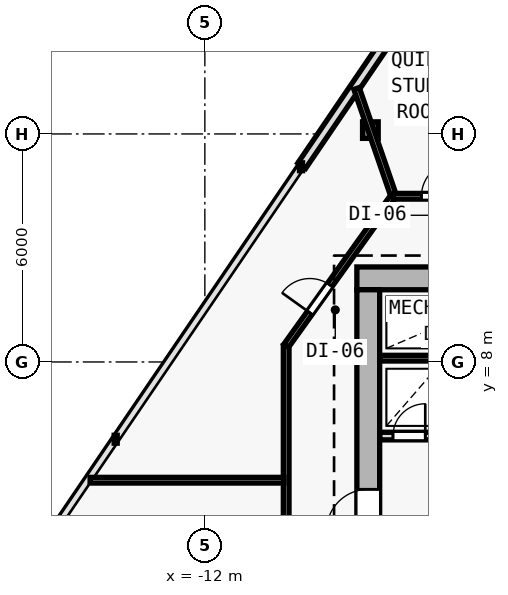
"""IFC4 building model, lengths in metres.
Left out: names, types, materials, properties, quantities, classifications, styles, units other than length and angle.
Written with IfcOpenShell. Run it as: python <this file> out.ifc"""

import sys

from ifc_helpers import new_model, si_unit, direction, frame, frame_2d, origin, origin_2d, place, context, subcontext, project, spatial, rectangle, i_section, extrude, element, fill, save


model = new_model("IFC4")
c1 = context("Model", 3, precision=1e-05, world=origin(), true_north=direction((0.0, 1.0)))
c2 = subcontext(c1, "Body", "Model", "MODEL_VIEW")
j1 = project(units=[si_unit("LENGTHUNIT", "METRE"), si_unit("PLANEANGLEUNIT", "RADIAN")], contexts=[c1])
p1 = place(None, origin())
s1 = spatial("IfcSite", under=j1, at=p1, CompositionType="ELEMENT")
p2 = place(p1, origin())
s2 = spatial("IfcBuilding", under=s1, at=p2, CompositionType="ELEMENT")
p3 = place(p2, frame((0.0, 0.0, 66.0)))
s3 = spatial("IfcBuildingStorey", under=s2, at=p3, CompositionType="ELEMENT", Elevation=66.0)
p4 = place(p3, frame((-7.7, 10.2, 0.0), z_axis=(0.0, 0.0, 1.0), x_axis=(1.0, 0.0, 0.0)))
e1 = element("IfcColumn", 1, at=p4, inside=s3, PredefinedType="COLUMN", context=c2, shape_type="SweptSolid", body=[
    extrude(i_section(OverallWidth=0.416, OverallDepth=0.446, WebThickness=0.025, FlangeThickness=0.04, FilletRadius=0.015, at=origin_2d()), origin(), (0.0, 0.0, 1.0), 3.6),
])
p5 = place(p3, frame((-7.644, 14.101, 0.006), z_axis=(0.008843162072, -0.002584924298, 0.999957557425), x_axis=(0.280566991813, 0.959834445675, 0.0)))
e2 = element("IfcColumn", 2, at=p5, inside=s3, PredefinedType="COLUMN", context=c2, shape_type="SweptSolid", body=[
    extrude(i_section(OverallWidth=0.412, OverallDepth=0.435, WebThickness=0.023, FlangeThickness=0.037, FilletRadius=0.015, at=origin_2d()), origin(), (0.0, 0.0, 1.0), 3.589),
])
p6 = place(p3, frame((-9.451, 13.163, 0.0), z_axis=(0.0, 0.0, 1.0), x_axis=(0.562478152622, 0.826812147844, 0.0)))
e3 = element("IfcWall", 3, at=p6, inside=s3, PredefinedType="SOLIDWALL", context=c2, shape_type="SweptSolid", body=[
    extrude(rectangle(XDim=12.232, YDim=0.25, at=frame_2d((6.116, 0.0))), origin(), (0.0, 0.0, 1.0), 3.35),
])
p7 = place(p6, frame((5.516, 0.0, 0.62)))
e4 = element("IfcOpeningElement", 4, at=p7, cuts=e3, PredefinedType="OPENING", context=c2, shape_type="SweptSolid", body=[
    extrude(rectangle(XDim=1.2, YDim=1.8, at=frame_2d((0.6, 0.9))), frame((0.0, 0.135, 0.0), z_axis=(0.0, -1.0, 0.0), x_axis=(1.0, 0.0, 0.0)), (0.0, 0.0, 1.0), 0.27),
])
p8 = place(p3, frame((8.0, 10.2, 0.0), z_axis=(0.0, 0.0, 1.0), x_axis=(-1.0, 0.0, 0.0)))
e5 = element("IfcWall", 5, at=p8, inside=s3, PredefinedType="SHEAR", context=c2, shape_type="SweptSolid", body=[
    extrude(rectangle(XDim=16.0, YDim=0.6, at=frame_2d((8.0, 0.0))), origin(), (0.0, 0.0, 1.0), 3.35),
])
p9 = place(p8, frame((4.45, 0.0, 0.0)))
e6 = element("IfcOpeningElement", 6, at=p9, cuts=e5, PredefinedType="OPENING", context=c2, shape_type="SweptSolid", body=[
    extrude(rectangle(XDim=1.1, YDim=2.15, at=frame_2d((0.55, 1.075))), frame((0.0, 0.31, 0.0), z_axis=(0.0, -1.0, 0.0), x_axis=(1.0, 0.0, 0.0)), (0.0, 0.0, 1.0), 0.62),
])
p10 = place(p3, frame((-7.7, -9.1, 0.0), z_axis=(0.0, 0.0, 1.0), x_axis=(0.0, 1.0, 0.0)))
e7 = element("IfcWall", 7, at=p10, inside=s3, PredefinedType="SHEAR", context=c2, shape_type="SweptSolid", body=[
    extrude(rectangle(XDim=19.0, YDim=0.6, at=frame_2d((9.5, 0.0))), origin(), (0.0, 0.0, 1.0), 3.35),
])
p11 = place(p10, frame((12.65, 0.0, 0.0)))
e8 = element("IfcOpeningElement", 8, at=p11, cuts=e7, PredefinedType="OPENING", context=c2, shape_type="SweptSolid", body=[
    extrude(rectangle(XDim=1.1, YDim=2.15, at=frame_2d((0.55, 1.075))), frame((0.0, 0.31, 0.0), z_axis=(0.0, -1.0, 0.0), x_axis=(1.0, 0.0, 0.0)), (0.0, 0.0, 1.0), 0.62),
])
p12 = place(p3, frame((-7.395, 6.05, 0.0), z_axis=(0.0, 0.0, 1.0), x_axis=(1.0, 0.0, 0.0)))
e9 = element("IfcWall", 9, at=p12, inside=s3, PredefinedType="SOLIDWALL", context=c2, shape_type="SweptSolid", body=[
    extrude(rectangle(XDim=3.545, YDim=0.2, at=frame_2d((1.772, 0.0))), origin(), (0.0, 0.0, 1.0), 3.35),
])
p13 = place(p12, frame((0.345, 0.0, 0.0)))
e10 = element("IfcOpeningElement", 10, at=p13, cuts=e9, PredefinedType="OPENING", context=c2, shape_type="SweptSolid", body=[
    extrude(rectangle(XDim=0.85, YDim=2.1, at=frame_2d((0.425, 1.05))), frame((0.0, 0.11, 0.0), z_axis=(0.0, -1.0, 0.0), x_axis=(1.0, 0.0, 0.0)), (0.0, 0.0, 1.0), 0.22),
])
p14 = place(p12, frame((2.145, 0.0, 0.0)))
e11 = element("IfcOpeningElement", 11, at=p14, cuts=e9, PredefinedType="OPENING", context=c2, shape_type="SweptSolid", body=[
    extrude(rectangle(XDim=0.85, YDim=2.1, at=frame_2d((0.425, 1.05))), frame((0.0, 0.11, 0.0), z_axis=(0.0, -1.0, 0.0), x_axis=(1.0, 0.0, 0.0)), (0.0, 0.0, 1.0), 0.22),
])
p15 = place(p3, frame((-7.395, 8.1, 0.0), z_axis=(0.0, 0.0, 1.0), x_axis=(1.0, 0.0, 0.0)))
e12 = element("IfcWall", 12, at=p15, inside=s3, PredefinedType="PARTITIONING", context=c2, shape_type="SweptSolid", body=[
    extrude(rectangle(XDim=3.545, YDim=0.15, at=frame_2d((1.772, 0.0))), origin(), (0.0, 0.0, 1.0), 3.35),
])
p16 = place(p3, frame((-9.86, -11.56, 0.0), z_axis=(0.0, 0.0, 1.0), x_axis=(0.0, 1.0, 0.0)))
e13 = element("IfcWall", 13, at=p16, inside=s3, PredefinedType="PARTITIONING", context=c2, shape_type="SweptSolid", body=[
    extrude(rectangle(XDim=19.986, YDim=0.15, at=frame_2d((9.993, 0.0))), origin(), (0.0, 0.0, 1.0), 2.609),
])
p17 = place(p16, frame((9.311, 0.0, 0.0)))
e14 = element("IfcOpeningElement", 14, at=p17, cuts=e13, PredefinedType="OPENING", context=c2, shape_type="SweptSolid", body=[
    extrude(rectangle(XDim=0.9, YDim=2.1, at=frame_2d((0.45, 1.05))), frame((0.0, 0.085, 0.0), z_axis=(0.0, -1.0, 0.0), x_axis=(1.0, 0.0, 0.0)), (0.0, 0.0, 1.0), 0.17),
])
p18 = place(p16, frame((4.681, 0.0, 0.0)))
e15 = element("IfcOpeningElement", 15, at=p18, cuts=e13, PredefinedType="OPENING", context=c2, shape_type="SweptSolid", body=[
    extrude(rectangle(XDim=0.9, YDim=2.1, at=frame_2d((0.45, 1.05))), frame((0.0, 0.085, 0.0), z_axis=(0.0, -1.0, 0.0), x_axis=(1.0, 0.0, 0.0)), (0.0, 0.0, 1.0), 0.17),
])
p19 = place(p16, frame((0.919, 0.0, 0.0)))
e16 = element("IfcOpeningElement", 16, at=p19, cuts=e13, PredefinedType="OPENING", context=c2, shape_type="SweptSolid", body=[
    extrude(rectangle(XDim=0.9, YDim=2.1, at=frame_2d((0.45, 1.05))), frame((0.0, 0.085, 0.0), z_axis=(0.0, -1.0, 0.0), x_axis=(1.0, 0.0, 0.0)), (0.0, 0.0, 1.0), 0.17),
])
p20 = place(p16, frame((13.684, 0.0, 0.0)))
e17 = element("IfcOpeningElement", 17, at=p20, cuts=e13, PredefinedType="OPENING", context=c2, shape_type="SweptSolid", body=[
    extrude(rectangle(XDim=0.9, YDim=2.1, at=frame_2d((0.45, 1.05))), frame((0.0, 0.085, 0.0), z_axis=(0.0, -1.0, 0.0), x_axis=(1.0, 0.0, 0.0)), (0.0, 0.0, 1.0), 0.17),
])
p21 = place(p3, frame((-9.86, 8.426, 0.0), z_axis=(0.0, 0.0, 1.0), x_axis=(0.582449511476, 0.812866881218, 0.0)))
e18 = element("IfcWall", 18, at=p21, inside=s3, PredefinedType="PARTITIONING", context=c2, shape_type="SweptSolid", body=[
    extrude(rectangle(XDim=4.84, YDim=0.15, at=frame_2d((2.42, 0.0))), origin(), (0.0, 0.0, 1.0), 2.725),
])
p22 = place(p21, frame((1.07, 0.0, 0.0)))
e19 = element("IfcOpeningElement", 19, at=p22, cuts=e18, PredefinedType="OPENING", context=c2, shape_type="SweptSolid", body=[
    extrude(rectangle(XDim=0.9, YDim=2.1, at=frame_2d((0.45, 1.05))), frame((0.0, 0.085, 0.0), z_axis=(0.0, -1.0, 0.0), x_axis=(1.0, 0.0, 0.0)), (0.0, 0.0, 1.0), 0.17),
])
p23 = place(p3, frame((-7.041, 12.36, 0.0), z_axis=(0.0, 0.0, 1.0), x_axis=(1.0, 0.0, 0.0)))
e20 = element("IfcWall", 20, at=p23, inside=s3, PredefinedType="PARTITIONING", context=c2, shape_type="SweptSolid", body=[
    extrude(rectangle(XDim=14.082, YDim=0.15, at=frame_2d((7.041, 0.0))), origin(), (0.0, 0.0, 1.0), 3.35),
])
p24 = place(p23, frame((12.784, 0.0, 0.0)))
e21 = element("IfcOpeningElement", 21, at=p24, cuts=e20, PredefinedType="OPENING", context=c2, shape_type="SweptSolid", body=[
    extrude(rectangle(XDim=0.85, YDim=2.1, at=frame_2d((0.425, 1.05))), frame((0.0, 0.085, 0.0), z_axis=(0.0, -1.0, 0.0), x_axis=(1.0, 0.0, 0.0)), (0.0, 0.0, 1.0), 0.17),
])
p25 = place(p23, frame((10.858, 0.0, 0.0)))
e22 = element("IfcOpeningElement", 22, at=p25, cuts=e20, PredefinedType="OPENING", context=c2, shape_type="SweptSolid", body=[
    extrude(rectangle(XDim=0.9, YDim=2.1, at=frame_2d((0.45, 1.05))), frame((0.0, 0.085, 0.0), z_axis=(0.0, -1.0, 0.0), x_axis=(1.0, 0.0, 0.0)), (0.0, 0.0, 1.0), 0.17),
])
p26 = place(p23, frame((8.904, 0.0, 0.0)))
e23 = element("IfcOpeningElement", 23, at=p26, cuts=e20, PredefinedType="OPENING", context=c2, shape_type="SweptSolid", body=[
    extrude(rectangle(XDim=0.85, YDim=2.1, at=frame_2d((0.425, 1.05))), frame((0.0, 0.085, 0.0), z_axis=(0.0, -1.0, 0.0), x_axis=(1.0, 0.0, 0.0)), (0.0, 0.0, 1.0), 0.17),
])
p27 = place(p23, frame((6.212, 0.0, 0.0)))
e24 = element("IfcOpeningElement", 24, at=p27, cuts=e20, PredefinedType="OPENING", context=c2, shape_type="SweptSolid", body=[
    extrude(rectangle(XDim=0.9, YDim=2.1, at=frame_2d((0.45, 1.05))), frame((0.0, 0.085, 0.0), z_axis=(0.0, -1.0, 0.0), x_axis=(1.0, 0.0, 0.0)), (0.0, 0.0, 1.0), 0.17),
])
p28 = place(p23, frame((3.763, 0.0, 0.0)))
e25 = element("IfcOpeningElement", 25, at=p28, cuts=e20, PredefinedType="OPENING", context=c2, shape_type="SweptSolid", body=[
    extrude(rectangle(XDim=0.85, YDim=2.1, at=frame_2d((0.425, 1.05))), frame((0.0, 0.085, 0.0), z_axis=(0.0, -1.0, 0.0), x_axis=(1.0, 0.0, 0.0)), (0.0, 0.0, 1.0), 0.17),
])
p29 = place(p23, frame((2.429, 0.0, 0.0)))
e26 = element("IfcOpeningElement", 26, at=p29, cuts=e20, PredefinedType="OPENING", context=c2, shape_type="SweptSolid", body=[
    extrude(rectangle(XDim=0.85, YDim=2.1, at=frame_2d((0.425, 1.05))), frame((0.0, 0.085, 0.0), z_axis=(0.0, -1.0, 0.0), x_axis=(1.0, 0.0, 0.0)), (0.0, 0.0, 1.0), 0.17),
])
p30 = place(p23, frame((0.74, 0.0, 0.0)))
e27 = element("IfcOpeningElement", 27, at=p30, cuts=e20, PredefinedType="OPENING", context=c2, shape_type="SweptSolid", body=[
    extrude(rectangle(XDim=0.9, YDim=2.1, at=frame_2d((0.45, 1.05))), frame((0.0, 0.085, 0.0), z_axis=(0.0, -1.0, 0.0), x_axis=(1.0, 0.0, 0.0)), (0.0, 0.0, 1.0), 0.17),
])
p31 = place(p3, frame((-7.047, 12.412, 0.0), z_axis=(0.0, 0.0, 1.0), x_axis=(-0.326108195871, 0.945332451884, 0.0)))
e28 = element("IfcWall", 28, at=p31, inside=s3, PredefinedType="PARTITIONING", context=c2, shape_type="SweptSolid", body=[
    extrude(rectangle(XDim=2.945, YDim=0.15, at=frame_2d((1.473, 0.0))), origin(), (0.0, 0.0, 1.0), 2.725),
])
p32 = place(p3, frame((-9.92, 4.889, 0.0), z_axis=(0.0, 0.0, 1.0), x_axis=(-1.0, 0.0, 0.0)))
e29 = element("IfcWall", 29, at=p32, inside=s3, PredefinedType="PARTITIONING", context=c2, shape_type="SweptSolid", body=[
    extrude(rectangle(XDim=5.099, YDim=0.15, at=frame_2d((2.549, 0.0))), origin(), (0.0, 0.0, 1.0), 2.735),
])
p33 = place(p11, origin())
e30 = element("IfcDoor", 30, at=p33, inside=s3, OperationType="SINGLE_SWING_LEFT", PredefinedType="DOOR", context=c2, shape_type="SweptSolid", body=[
    extrude(rectangle(XDim=1.1, YDim=2.15, at=frame_2d((0.55, 1.075))), frame((0.0, 0.025, 0.0), z_axis=(0.0, -1.0, 0.0), x_axis=(1.0, 0.0, 0.0)), (0.0, 0.0, 1.0), 0.05),
])
fill(e8, e30)
p34 = place(p13, origin())
e31 = element("IfcDoor", 31, at=p34, inside=s3, OperationType="SINGLE_SWING_RIGHT", PredefinedType="DOOR", context=c2, shape_type="SweptSolid", body=[
    extrude(rectangle(XDim=0.85, YDim=2.1, at=frame_2d((0.425, 1.05))), frame((0.0, 0.025, 0.0), z_axis=(0.0, -1.0, 0.0), x_axis=(1.0, 0.0, 0.0)), (0.0, 0.0, 1.0), 0.05),
])
fill(e10, e31)
p35 = place(p30, origin())
e32 = element("IfcDoor", 32, at=p35, inside=s3, OperationType="SINGLE_SWING_RIGHT", PredefinedType="DOOR", context=c2, shape_type="SweptSolid", body=[
    extrude(rectangle(XDim=0.9, YDim=2.1, at=frame_2d((0.45, 1.05))), frame((0.0, 0.025, 0.0), z_axis=(0.0, -1.0, 0.0), x_axis=(1.0, 0.0, 0.0)), (0.0, 0.0, 1.0), 0.05),
])
fill(e27, e32)
p36 = place(p22, origin())
e33 = element("IfcDoor", 33, at=p36, inside=s3, OperationType="SINGLE_SWING_LEFT", PredefinedType="DOOR", context=c2, shape_type="SweptSolid", body=[
    extrude(rectangle(XDim=0.9, YDim=2.1, at=frame_2d((0.45, 1.05))), frame((0.0, 0.025, 0.0), z_axis=(0.0, -1.0, 0.0), x_axis=(1.0, 0.0, 0.0)), (0.0, 0.0, 1.0), 0.05),
])
fill(e19, e33)
save(model, sys.argv[1])
